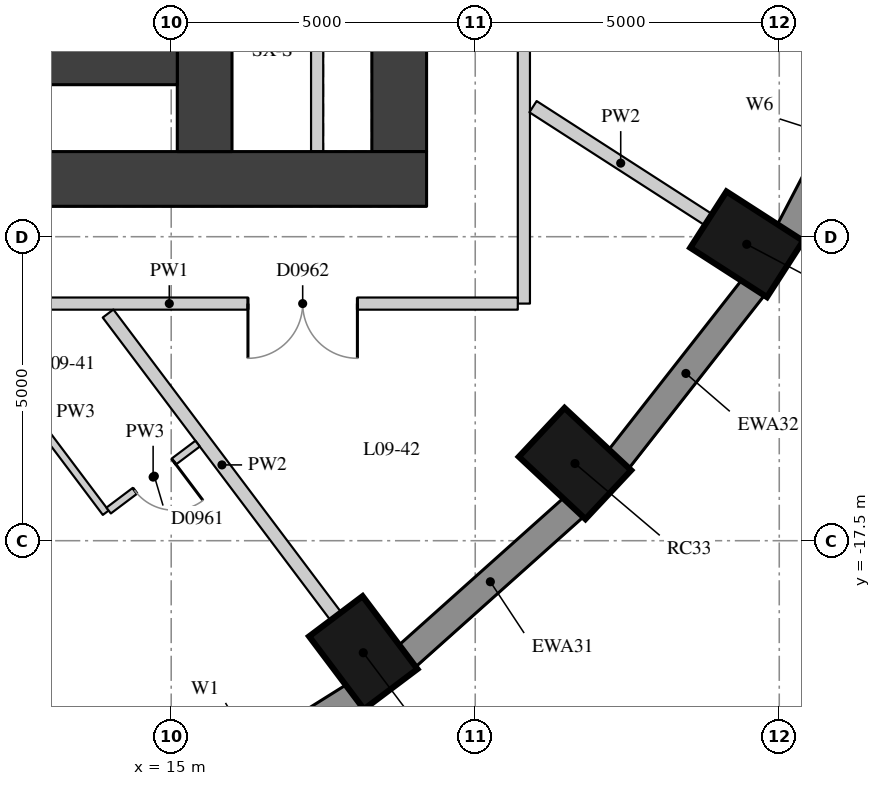
"""IFC4 building model, lengths in metres.
Left out: names, types, materials, properties, quantities, classifications, styles, units other than length and angle.
Written with IfcOpenShell. Run it as: python <this file> out.ifc"""

import sys

from ifc_helpers import new_model, si_unit, direction, frame, frame_2d, origin, origin_2d, place, context, subcontext, project, spatial, rectangle, extrude, element, fill, save


model = new_model("IFC4")
c1 = context("Model", 3, precision=1e-05, world=origin(), true_north=direction((0.0, 1.0)))
c2 = subcontext(c1, "Body", "Model", "MODEL_VIEW")
j1 = project(units=[si_unit("LENGTHUNIT", "METRE"), si_unit("PLANEANGLEUNIT", "RADIAN")], contexts=[c1])
p1 = place(None, origin())
s1 = spatial("IfcSite", under=j1, at=p1, CompositionType="ELEMENT")
p2 = place(p1, origin())
s2 = spatial("IfcBuilding", under=s1, at=p2, CompositionType="ELEMENT")
p3 = place(p2, frame((0.0, 0.0, 38.2)))
s3 = spatial("IfcBuildingStorey", under=s2, at=p3, CompositionType="ELEMENT", Elevation=38.2)
for number, where, z_axis, x_axis in (
    (1, (18.159, -19.343, 0.0), (0.0, 0.0, 1.0), (0.601, -0.799, 0.0)),
    (2, (21.641, -16.23, 0.0), (0.0, 0.0, 1.0), (0.73, -0.683, 0.0)),
    (3, (24.465, -12.625, 0.0), (0.0, 0.0, 1.0), (0.841, -0.541, 0.0)),
):
    element("IfcColumn", number, at=place(p3, frame(where, z_axis=z_axis, x_axis=x_axis)), inside=s3, PredefinedType="COLUMN", context=c2, shape_type="SweptSolid", body=[
        extrude(rectangle(XDim=1.5, YDim=1.1, at=origin_2d()), origin(), (0.0, 0.0, 1.0), 3.3),
    ])
p4 = place(p3, frame((14.817, -22.051, 0.0), z_axis=(0.0, 0.0, 1.0), x_axis=(0.847635480093, 0.530579016629, 0.0)))
e4 = element("IfcWall", 4, at=p4, inside=s3, PredefinedType="SOLIDWALL", context=c2, shape_type="SweptSolid", body=[
    extrude(rectangle(XDim=3.782, YDim=0.45, at=frame_2d((1.891, 0.0))), origin(), (0.0, 0.0, 1.0), 3.02),
])
p5 = place(p4, frame((0.791, 0.0, 0.4)))
e5 = element("IfcOpeningElement", 5, at=p5, cuts=e4, PredefinedType="OPENING", context=c2, shape_type="SweptSolid", body=[
    extrude(rectangle(XDim=2.2, YDim=1.75, at=frame_2d((1.1, 0.875))), frame((0.0, 0.235, 0.0), z_axis=(0.0, -1.0, 0.0), x_axis=(1.0, 0.0, 0.0)), (0.0, 0.0, 1.0), 0.47),
])
p6 = place(p3, frame((18.871, -19.407, 0.0), z_axis=(0.0, 0.0, 1.0), x_axis=(0.745526233716, 0.66647628228, 0.0)))
e6 = element("IfcWall", 6, at=p6, inside=s3, PredefinedType="SOLIDWALL", context=c2, shape_type="SweptSolid", body=[
    extrude(rectangle(XDim=3.697, YDim=0.45, at=frame_2d((1.848, 0.0))), origin(), (0.0, 0.0, 1.0), 3.02),
])
p7 = place(p3, frame((22.352, -16.17, 0.0), z_axis=(0.0, 0.0, 1.0), x_axis=(0.616661975264, 0.787228053529, 0.0)))
e7 = element("IfcWall", 7, at=p7, inside=s3, PredefinedType="SOLIDWALL", context=c2, shape_type="SweptSolid", body=[
    extrude(rectangle(XDim=3.61, YDim=0.45, at=frame_2d((1.805, 0.0))), origin(), (0.0, 0.0, 1.0), 3.02),
])
p8 = place(p3, frame((25.152, -12.437, 0.0), z_axis=(0.0, 0.0, 1.0), x_axis=(0.462492775226, 0.886623050041, 0.0)))
e8 = element("IfcWall", 8, at=p8, inside=s3, PredefinedType="SOLIDWALL", context=c2, shape_type="SweptSolid", body=[
    extrude(rectangle(XDim=3.532, YDim=0.45, at=frame_2d((1.766, 0.0))), origin(), (0.0, 0.0, 1.0), 3.02),
])
p9 = place(p8, frame((1.466, 0.0, 0.4)))
e9 = element("IfcOpeningElement", 9, at=p9, cuts=e8, PredefinedType="OPENING", context=c2, shape_type="SweptSolid", body=[
    extrude(rectangle(XDim=0.6, YDim=1.75, at=frame_2d((0.3, 0.875))), frame((0.0, 0.235, 0.0), z_axis=(0.0, -1.0, 0.0), x_axis=(1.0, 0.0, 0.0)), (0.0, 0.0, 1.0), 0.47),
])
p10 = place(p3, frame((18.75, -11.1, 0.0), z_axis=(0.0, 0.0, 1.0), x_axis=(0.0, 1.0, 0.0)))
e10 = element("IfcWall", 10, at=p10, inside=s3, PredefinedType="SHEAR", context=c2, shape_type="SweptSolid", body=[
    extrude(rectangle(XDim=22.2, YDim=0.9, at=frame_2d((11.1, 0.0))), origin(), (0.0, 0.0, 1.0), 3.02),
])
p11 = place(p10, frame((15.675, 0.0, 0.0)))
e11 = element("IfcOpeningElement", 11, at=p11, cuts=e10, PredefinedType="OPENING", context=c2, shape_type="SweptSolid", body=[
    extrude(rectangle(XDim=1.5, YDim=2.1, at=frame_2d((0.75, 1.05))), frame((0.0, 0.46, 0.0), z_axis=(0.0, -1.0, 0.0), x_axis=(1.0, 0.0, 0.0)), (0.0, 0.0, 1.0), 0.92),
])
p12 = place(p10, frame((4.775, 0.0, 0.0)))
e12 = element("IfcOpeningElement", 12, at=p12, cuts=e10, PredefinedType="OPENING", context=c2, shape_type="SweptSolid", body=[
    extrude(rectangle(XDim=1.5, YDim=2.1, at=frame_2d((0.75, 1.05))), frame((0.0, 0.46, 0.0), z_axis=(0.0, -1.0, 0.0), x_axis=(1.0, 0.0, 0.0)), (0.0, 0.0, 1.0), 0.92),
])
p13 = place(p3, frame((4.0, -11.55, 0.0), z_axis=(0.0, 0.0, 1.0), x_axis=(1.0, 0.0, 0.0)))
e13 = element("IfcWall", 13, at=p13, inside=s3, PredefinedType="SHEAR", context=c2, shape_type="SweptSolid", body=[
    extrude(rectangle(XDim=15.2, YDim=0.9, at=frame_2d((7.6, 0.0))), origin(), (0.0, 0.0, 1.0), 3.02),
])
p14 = place(p3, frame((15.55, -11.1, 0.0), z_axis=(0.0, 0.0, 1.0), x_axis=(0.0, 1.0, 0.0)))
e14 = element("IfcWall", 14, at=p14, inside=s3, PredefinedType="SHEAR", context=c2, shape_type="SweptSolid", body=[
    extrude(rectangle(XDim=22.2, YDim=0.9, at=frame_2d((11.1, 0.0))), origin(), (0.0, 0.0, 1.0), 3.02),
])
p15 = place(p14, frame((15.6, 0.0, 0.0)))
e15 = element("IfcOpeningElement", 15, at=p15, cuts=e14, PredefinedType="OPENING", context=c2, shape_type="SweptSolid", body=[
    extrude(rectangle(XDim=1.0, YDim=2.1, at=frame_2d((0.5, 1.05))), frame((0.0, 0.46, 0.0), z_axis=(0.0, -1.0, 0.0), x_axis=(1.0, 0.0, 0.0)), (0.0, 0.0, 1.0), 0.92),
])
p16 = place(p14, frame((5.6, 0.0, 0.0)))
e16 = element("IfcOpeningElement", 16, at=p16, cuts=e14, PredefinedType="OPENING", context=c2, shape_type="SweptSolid", body=[
    extrude(rectangle(XDim=1.0, YDim=2.1, at=frame_2d((0.5, 1.05))), frame((0.0, 0.46, 0.0), z_axis=(0.0, -1.0, 0.0), x_axis=(1.0, 0.0, 0.0)), (0.0, 0.0, 1.0), 0.92),
])
p17 = place(p3, frame((4.9, -9.55, 0.0), z_axis=(0.0, 0.0, 1.0), x_axis=(1.0, 0.0, 0.0)))
e17 = element("IfcWall", 17, at=p17, inside=s3, PredefinedType="SHEAR", context=c2, shape_type="SweptSolid", body=[
    extrude(rectangle(XDim=10.2, YDim=0.9, at=frame_2d((5.1, 0.0))), origin(), (0.0, 0.0, 1.0), 3.02),
])
p18 = place(p3, frame((17.4, -11.1, 0.0), z_axis=(0.0, 0.0, 1.0), x_axis=(0.0, 1.0, 0.0)))
e18 = element("IfcWall", 18, at=p18, inside=s3, PredefinedType="PARTITIONING", context=c2, shape_type="SweptSolid", body=[
    extrude(rectangle(XDim=4.2, YDim=0.2, at=frame_2d((2.1, 0.0))), origin(), (0.0, 0.0, 1.0), 3.02),
])
p19 = place(p3, frame((20.8, 13.5, 0.0), z_axis=(0.0, 0.0, 1.0), x_axis=(0.0, -1.0, 0.0)))
e19 = element("IfcWall", 19, at=p19, inside=s3, PredefinedType="PARTITIONING", context=c2, shape_type="SweptSolid", body=[
    extrude(rectangle(XDim=27.1, YDim=0.2, at=frame_2d((13.55, 0.0))), origin(), (0.0, 0.0, 1.0), 3.02),
])
p20 = place(p19, frame((17.733, 0.0, 0.0)))
e20 = element("IfcOpeningElement", 20, at=p20, cuts=e19, PredefinedType="OPENING", context=c2, shape_type="SweptSolid", body=[
    extrude(rectangle(XDim=1.8, YDim=2.1, at=frame_2d((0.9, 1.05))), frame((0.0, 0.11, 0.0), z_axis=(0.0, -1.0, 0.0), x_axis=(1.0, 0.0, 0.0)), (0.0, 0.0, 1.0), 0.22),
])
p21 = place(p19, frame((7.467, 0.0, 0.0)))
e21 = element("IfcOpeningElement", 21, at=p21, cuts=e19, PredefinedType="OPENING", context=c2, shape_type="SweptSolid", body=[
    extrude(rectangle(XDim=1.8, YDim=2.1, at=frame_2d((0.9, 1.05))), frame((0.0, 0.11, 0.0), z_axis=(0.0, -1.0, 0.0), x_axis=(1.0, 0.0, 0.0)), (0.0, 0.0, 1.0), 0.22),
])
p22 = place(p3, frame((20.7, -13.6, 0.0), z_axis=(0.0, 0.0, 1.0), x_axis=(-1.0, 0.0, 0.0)))
e22 = element("IfcWall", 22, at=p22, inside=s3, PredefinedType="PARTITIONING", context=c2, shape_type="SweptSolid", body=[
    extrude(rectangle(XDim=11.463, YDim=0.2, at=frame_2d((5.731, 0.0))), origin(), (0.0, 0.0, 1.0), 3.02),
])
p23 = place(p22, frame((9.509, 0.0, 0.0)))
e23 = element("IfcOpeningElement", 23, at=p23, cuts=e22, PredefinedType="OPENING", context=c2, shape_type="SweptSolid", body=[
    extrude(rectangle(XDim=1.1, YDim=2.1, at=frame_2d((0.55, 1.05))), frame((0.0, 0.11, 0.0), z_axis=(0.0, -1.0, 0.0), x_axis=(1.0, 0.0, 0.0)), (0.0, 0.0, 1.0), 0.22),
])
p24 = place(p22, frame((2.638, 0.0, 0.0)))
e24 = element("IfcOpeningElement", 24, at=p24, cuts=e22, PredefinedType="OPENING", context=c2, shape_type="SweptSolid", body=[
    extrude(rectangle(XDim=1.8, YDim=2.1, at=frame_2d((0.9, 1.05))), frame((0.0, 0.11, 0.0), z_axis=(0.0, -1.0, 0.0), x_axis=(1.0, 0.0, 0.0)), (0.0, 0.0, 1.0), 0.22),
])
p25 = place(p3, frame((17.708, -18.743, 0.0), z_axis=(0.0, 0.0, 1.0), x_axis=(-0.601177883261, 0.799115231164, 0.0)))
e25 = element("IfcWall", 25, at=p25, inside=s3, PredefinedType="PARTITIONING", context=c2, shape_type="SweptSolid", body=[
    extrude(rectangle(XDim=6.231, YDim=0.22, at=frame_2d((3.116, 0.0))), origin(), (0.0, 0.0, 1.0), 3.02),
])
p26 = place(p3, frame((23.835, -12.219, 0.0), z_axis=(0.0, 0.0, 1.0), x_axis=(-0.840694872373, 0.541509124176, 0.0)))
e26 = element("IfcWall", 26, at=p26, inside=s3, PredefinedType="PARTITIONING", context=c2, shape_type="SweptSolid", body=[
    extrude(rectangle(XDim=3.43, YDim=0.22, at=frame_2d((1.715, 0.0))), origin(), (0.0, 0.0, 1.0), 3.02),
])
p27 = place(p3, frame((11.435, -13.732, 0.0), z_axis=(0.0, 0.0, 1.0), x_axis=(0.601178939522, -0.799114436533, 0.0)))
e27 = element("IfcWall", 27, at=p27, inside=s3, PredefinedType="PARTITIONING", context=c2, shape_type="SweptSolid", body=[
    extrude(rectangle(XDim=4.139, YDim=0.12, at=frame_2d((2.07, 0.0))), origin(), (0.0, 0.0, 1.0), 3.02),
])
p28 = place(p3, frame((13.971, -17.004, 0.0), z_axis=(0.0, 0.0, 1.0), x_axis=(0.799231057954, 0.60102388971, 0.0)))
e28 = element("IfcWall", 28, at=p28, inside=s3, PredefinedType="PARTITIONING", context=c2, shape_type="SweptSolid", body=[
    extrude(rectangle(XDim=1.83, YDim=0.12, at=frame_2d((0.915, 0.0))), origin(), (0.0, 0.0, 1.0), 3.02),
])
p29 = place(p28, frame((0.54, 0.0, 0.0)))
e29 = element("IfcOpeningElement", 29, at=p29, cuts=e28, PredefinedType="OPENING", context=c2, shape_type="SweptSolid", body=[
    extrude(rectangle(XDim=0.8, YDim=2.1, at=frame_2d((0.4, 1.05))), frame((0.0, 0.07, 0.0), z_axis=(0.0, -1.0, 0.0), x_axis=(1.0, 0.0, 0.0)), (0.0, 0.0, 1.0), 0.14),
])
p30 = place(p29, origin())
e30 = element("IfcDoor", 30, at=p30, inside=s3, OperationType="SINGLE_SWING_LEFT", PredefinedType="DOOR", context=c2, shape_type="SweptSolid", body=[
    extrude(rectangle(XDim=0.8, YDim=2.1, at=frame_2d((0.4, 1.05))), frame((0.0, 0.025, 0.0), z_axis=(0.0, -1.0, 0.0), x_axis=(1.0, 0.0, 0.0)), (0.0, 0.0, 1.0), 0.05),
])
fill(e29, e30)
p31 = place(p24, origin())
e31 = element("IfcDoor", 31, at=p31, inside=s3, OperationType="DOUBLE_DOOR_SINGLE_SWING", PredefinedType="DOOR", context=c2, shape_type="SweptSolid", body=[
    extrude(rectangle(XDim=1.8, YDim=2.1, at=frame_2d((0.9, 1.05))), frame((0.0, 0.025, 0.0), z_axis=(0.0, -1.0, 0.0), x_axis=(1.0, 0.0, 0.0)), (0.0, 0.0, 1.0), 0.05),
])
fill(e24, e31)
save(model, sys.argv[1])
